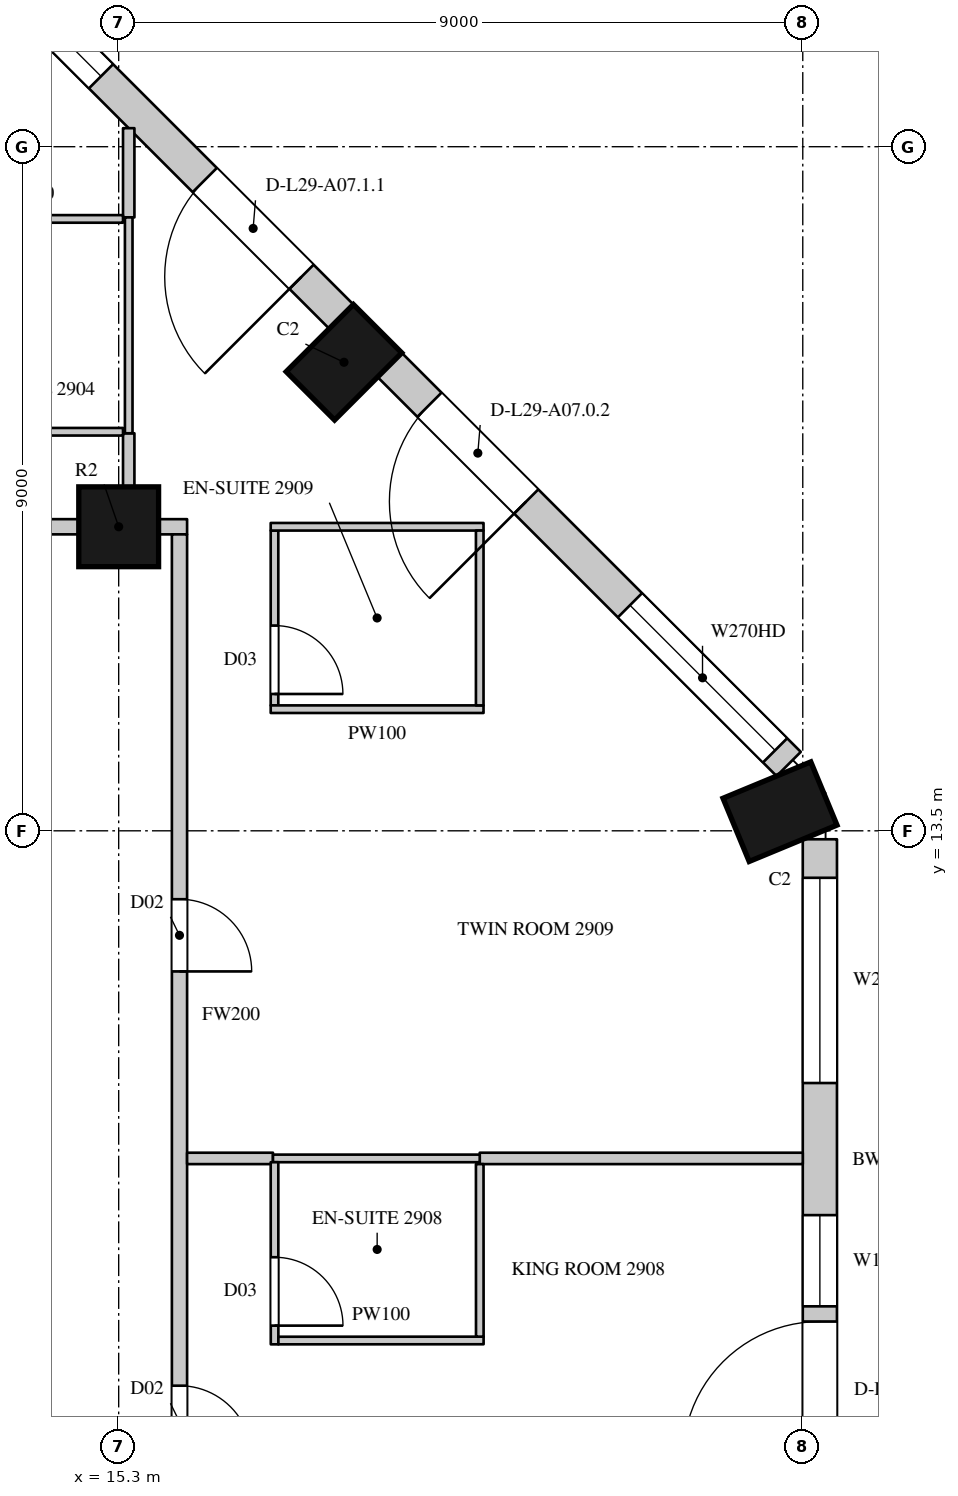
"""IFC4 building model, lengths in metres.
Left out: names, types, materials, properties, quantities, classifications, styles, units other than length and angle.
Written with IfcOpenShell. Run it as: python <this file> out.ifc"""

import sys

from ifc_helpers import new_model, si_unit, direction, frame, frame_2d, origin, origin_2d, place, context, subcontext, project, spatial, rectangle, circle, extrude, element, fill, save


model = new_model("IFC4")
c1 = context("Model", 3, precision=1e-05, world=origin(), true_north=direction((0.0, 1.0)))
c2 = subcontext(c1, "Body", "Model", "MODEL_VIEW")
j1 = project(units=[si_unit("LENGTHUNIT", "METRE"), si_unit("PLANEANGLEUNIT", "RADIAN")], contexts=[c1])
p1 = place(None, origin())
s1 = spatial("IfcSite", under=j1, at=p1, CompositionType="ELEMENT")
p2 = place(p1, origin())
s2 = spatial("IfcBuilding", under=s1, at=p2, CompositionType="ELEMENT")
p3 = place(p2, frame((0.0, 0.0, 134.7)))
s3 = spatial("IfcBuildingStorey", under=s2, at=p3, CompositionType="ELEMENT", Elevation=134.7)
for number, where, z_axis, x_axis in (
    (1, (24.0, 13.752, 0.0), (0.0, 0.0, 1.0), (-0.383, 0.924, 0.0)),
    (2, (18.264, 19.664, 0.0), (0.0, 0.0, 1.0), (-0.707, 0.707, 0.0)),
):
    element("IfcColumn", number, at=place(p3, frame(where, z_axis=z_axis, x_axis=x_axis)), inside=s3, PredefinedType="COLUMN", context=c2, shape_type="SweptSolid", body=[
        extrude(rectangle(XDim=0.9, YDim=1.25, at=origin_2d()), origin(), (0.0, 0.0, 1.0), 3.6),
    ])
p4 = place(p3, frame((15.3, 17.5, 0.0), z_axis=(0.0, 0.0, 1.0), x_axis=(1.0, 0.0, 0.0)))
e3 = element("IfcColumn", 3, at=p4, inside=s3, PredefinedType="COLUMN", context=c2, shape_type="SweptSolid", body=[
    extrude(circle(Radius=0.525, at=origin_2d()), origin(), (0.0, 0.0, 1.0), 3.6),
])
p5 = place(p3, frame((24.525, 4.95, 0.0), z_axis=(0.0, 0.0, 1.0), x_axis=(0.0, 1.0, 0.0)))
e4 = element("IfcWall", 4, at=p5, inside=s3, PredefinedType="SOLIDWALL", context=c2, shape_type="SweptSolid", body=[
    extrude(rectangle(XDim=8.439, YDim=0.45, at=frame_2d((4.219, 0.0))), origin(), (0.0, 0.0, 1.0), 3.3),
])
p6 = place(p5, frame((0.294, 0.0, 0.0)))
e5 = element("IfcOpeningElement", 5, at=p6, cuts=e4, PredefinedType="OPENING", context=c2, shape_type="SweptSolid", body=[
    extrude(rectangle(XDim=1.8, YDim=2.4, at=frame_2d((0.9, 1.2))), frame((0.0, 0.235, 0.0), z_axis=(0.0, -1.0, 0.0), x_axis=(1.0, 0.0, 0.0)), (0.0, 0.0, 1.0), 0.47),
])
p7 = place(p5, frame((2.294, 0.0, 1.05)))
e6 = element("IfcOpeningElement", 6, at=p7, cuts=e4, PredefinedType="OPENING", context=c2, shape_type="SweptSolid", body=[
    extrude(rectangle(XDim=1.2, YDim=2.0, at=frame_2d((0.6, 1.0))), frame((0.0, 0.235, 0.0), z_axis=(0.0, -1.0, 0.0), x_axis=(1.0, 0.0, 0.0)), (0.0, 0.0, 1.0), 0.47),
])
p8 = place(p5, frame((5.232, 0.0, 1.05)))
e7 = element("IfcOpeningElement", 7, at=p8, cuts=e4, PredefinedType="OPENING", context=c2, shape_type="SweptSolid", body=[
    extrude(rectangle(XDim=2.7, YDim=2.0, at=frame_2d((1.35, 1.0))), frame((0.0, 0.235, 0.0), z_axis=(0.0, -1.0, 0.0), x_axis=(1.0, 0.0, 0.0)), (0.0, 0.0, 1.0), 0.47),
])
p9 = place(p3, frame((24.115, 14.379, 0.0), z_axis=(0.0, 0.0, 1.0), x_axis=(-0.707106781187, 0.707106781187, 0.0)))
e8 = element("IfcWall", 8, at=p9, inside=s3, PredefinedType="SOLIDWALL", context=c2, shape_type="SweptSolid", body=[
    extrude(rectangle(XDim=7.424, YDim=0.45, at=frame_2d((3.712, 0.0))), origin(), (0.0, 0.0, 1.0), 3.3),
])
p10 = place(p9, frame((0.253, 0.0, 1.05)))
e9 = element("IfcOpeningElement", 9, at=p10, cuts=e8, PredefinedType="OPENING", context=c2, shape_type="SweptSolid", body=[
    extrude(rectangle(XDim=2.7, YDim=2.0, at=frame_2d((1.35, 1.0))), frame((0.0, 0.235, 0.0), z_axis=(0.0, -1.0, 0.0), x_axis=(1.0, 0.0, 0.0)), (0.0, 0.0, 1.0), 0.47),
])
p11 = place(p9, frame((4.884, 0.0, 0.0)))
e10 = element("IfcOpeningElement", 10, at=p11, cuts=e8, PredefinedType="OPENING", context=c2, shape_type="SweptSolid", body=[
    extrude(rectangle(XDim=1.8, YDim=2.4, at=frame_2d((0.9, 1.2))), frame((0.0, 0.235, 0.0), z_axis=(0.0, -1.0, 0.0), x_axis=(1.0, 0.0, 0.0)), (0.0, 0.0, 1.0), 0.47),
])
p12 = place(p3, frame((18.229, 20.265, 0.0), z_axis=(0.0, 0.0, 1.0), x_axis=(-0.707106781187, 0.707106781187, 0.0)))
e11 = element("IfcWall", 11, at=p12, inside=s3, PredefinedType="SOLIDWALL", context=c2, shape_type="SweptSolid", body=[
    extrude(rectangle(XDim=7.424, YDim=0.45, at=frame_2d((3.712, 0.0))), origin(), (0.0, 0.0, 1.0), 3.3),
])
p13 = place(p12, frame((0.74, 0.0, 0.0)))
e12 = element("IfcOpeningElement", 12, at=p13, cuts=e11, PredefinedType="OPENING", context=c2, shape_type="SweptSolid", body=[
    extrude(rectangle(XDim=1.8, YDim=2.4, at=frame_2d((0.9, 1.2))), frame((0.0, 0.235, 0.0), z_axis=(0.0, -1.0, 0.0), x_axis=(1.0, 0.0, 0.0)), (0.0, 0.0, 1.0), 0.47),
])
p14 = place(p12, frame((4.471, 0.0, 1.05)))
e13 = element("IfcOpeningElement", 13, at=p14, cuts=e11, PredefinedType="OPENING", context=c2, shape_type="SweptSolid", body=[
    extrude(rectangle(XDim=2.7, YDim=2.0, at=frame_2d((1.35, 1.0))), frame((0.0, 0.235, 0.0), z_axis=(0.0, -1.0, 0.0), x_axis=(1.0, 0.0, 0.0)), (0.0, 0.0, 1.0), 0.47),
])
p15 = place(p3, frame((23.15, 16.864, 0.0), z_axis=(0.0, 0.0, 1.0), x_axis=(-0.707106781187, 0.707106781187, 0.0)))
e14 = element("IfcWall", 14, at=p15, inside=s3, PredefinedType="SOLIDWALL", context=c2, shape_type="SweptSolid", body=[
    extrude(rectangle(XDim=1.445, YDim=0.45, at=frame_2d((0.722, 0.0))), origin(), (0.0, 0.0, 1.0), 0.6),
])
p16 = place(p3, frame((19.937, 20.078, 0.0), z_axis=(0.0, 0.0, 1.0), x_axis=(-0.707106781187, 0.707106781187, 0.0)))
e15 = element("IfcWall", 15, at=p16, inside=s3, PredefinedType="SOLIDWALL", context=c2, shape_type="SweptSolid", body=[
    extrude(rectangle(XDim=1.781, YDim=0.45, at=frame_2d((0.89, 0.0))), origin(), (0.0, 0.0, 1.0), 0.6),
])
p17 = place(p3, frame((16.486, 23.529, 0.0), z_axis=(0.0, 0.0, 1.0), x_axis=(-0.707022305137, 0.707191247145, 0.0)))
e16 = element("IfcWall", 16, at=p17, inside=s3, PredefinedType="SOLIDWALL", context=c2, shape_type="SweptSolid", body=[
    extrude(rectangle(XDim=1.445, YDim=0.45, at=frame_2d((0.723, 0.0))), origin(), (0.0, 0.0, 1.0), 0.6),
])
p18 = place(p3, frame((6.825, 17.5, 0.0), z_axis=(0.0, 0.0, 1.0), x_axis=(1.0, 0.0, 0.0)))
e17 = element("IfcWall", 17, at=p18, inside=s3, PredefinedType="PARTITIONING", context=c2, shape_type="SweptSolid", body=[
    extrude(rectangle(XDim=7.95, YDim=0.2, at=frame_2d((3.975, 0.0))), origin(), (0.0, 0.0, 1.0), 2.75),
])
p19 = place(p18, frame((1.55, 0.0, 0.0)))
e18 = element("IfcOpeningElement", 18, at=p19, cuts=e17, PredefinedType="OPENING", context=c2, shape_type="SweptSolid", body=[
    extrude(rectangle(XDim=1.1, YDim=2.4, at=frame_2d((0.55, 1.2))), frame((0.0, 0.11, 0.0), z_axis=(0.0, -1.0, 0.0), x_axis=(1.0, 0.0, 0.0)), (0.0, 0.0, 1.0), 0.22),
])
p20 = place(p3, frame((15.825, 17.5, 0.0), z_axis=(0.0, 0.0, 1.0), x_axis=(1.0, 0.0, 0.0)))
e19 = element("IfcWall", 19, at=p20, inside=s3, PredefinedType="PARTITIONING", context=c2, shape_type="SweptSolid", body=[
    extrude(rectangle(XDim=0.375, YDim=0.2, at=frame_2d((0.188, 0.0))), origin(), (0.0, 0.0, 1.0), 3.3),
])
p21 = place(p3, frame((16.1, 4.75, 0.0), z_axis=(0.0, 0.0, 1.0), x_axis=(0.0, 1.0, 0.0)))
e20 = element("IfcWall", 20, at=p21, inside=s3, PredefinedType="PARTITIONING", context=c2, shape_type="SweptSolid", body=[
    extrude(rectangle(XDim=12.65, YDim=0.2, at=frame_2d((6.325, 0.0))), origin(), (0.0, 0.0, 1.0), 3.3),
])
p22 = place(p21, frame((0.5, 0.0, 0.0)))
e21 = element("IfcOpeningElement", 21, at=p22, cuts=e20, PredefinedType="OPENING", context=c2, shape_type="SweptSolid", body=[
    extrude(rectangle(XDim=0.95, YDim=2.2, at=frame_2d((0.475, 1.1))), frame((0.0, 0.11, 0.0), z_axis=(0.0, -1.0, 0.0), x_axis=(1.0, 0.0, 0.0)), (0.0, 0.0, 1.0), 0.22),
])
p23 = place(p21, frame((6.9, 0.0, 0.0)))
e22 = element("IfcOpeningElement", 22, at=p23, cuts=e20, PredefinedType="OPENING", context=c2, shape_type="SweptSolid", body=[
    extrude(rectangle(XDim=0.95, YDim=2.2, at=frame_2d((0.475, 1.1))), frame((0.0, 0.11, 0.0), z_axis=(0.0, -1.0, 0.0), x_axis=(1.0, 0.0, 0.0)), (0.0, 0.0, 1.0), 0.22),
])
p24 = place(p3, frame((15.432, 18.016, 0.0), z_axis=(0.0, 0.0, 1.0), x_axis=(0.0, 1.0, 0.0)))
e23 = element("IfcWall", 23, at=p24, inside=s3, PredefinedType="PARTITIONING", context=c2, shape_type="SweptSolid", body=[
    extrude(rectangle(XDim=0.714, YDim=0.15, at=frame_2d((0.357, 0.0))), origin(), (0.0, 0.0, 1.0), 3.3),
])
p25 = place(p3, frame((15.432, 21.57, 0.0), z_axis=(0.0, 0.0, 1.0), x_axis=(0.0, 1.0, 0.0)))
e24 = element("IfcWall", 24, at=p25, inside=s3, PredefinedType="PARTITIONING", context=c2, shape_type="SweptSolid", body=[
    extrude(rectangle(XDim=1.174, YDim=0.15, at=frame_2d((0.587, 0.0))), origin(), (0.0, 0.0, 1.0), 3.3),
])
p26 = place(p3, frame((16.2, 9.19, 0.0), z_axis=(0.0, 0.0, 1.0), x_axis=(1.0, 0.0, 0.0)))
e25 = element("IfcWall", 25, at=p26, inside=s3, PredefinedType="PARTITIONING", context=c2, shape_type="SweptSolid", body=[
    extrude(rectangle(XDim=1.13, YDim=0.15, at=frame_2d((0.565, 0.0))), origin(), (0.0, 0.0, 1.0), 2.65),
])
p27 = place(p3, frame((20.05, 9.19, 0.0), z_axis=(0.0, 0.0, 1.0), x_axis=(1.0, 0.0, 0.0)))
e26 = element("IfcWall", 26, at=p27, inside=s3, PredefinedType="PARTITIONING", context=c2, shape_type="SweptSolid", body=[
    extrude(rectangle(XDim=4.25, YDim=0.15, at=frame_2d((2.125, 0.0))), origin(), (0.0, 0.0, 1.0), 2.65),
])
for number, where, z_axis, x_axis in (
    (27, (12.786, 18.75, 0.0), (0.0, 0.0, 1.0), (1.0, 0.0, 0.0)),
    (28, (12.786, 21.55, 0.0), (0.0, 0.0, 1.0), (1.0, 0.0, 0.0)),
):
    element("IfcWall", number, at=place(p3, frame(where, z_axis=z_axis, x_axis=x_axis)), inside=s3, PredefinedType="PARTITIONING", context=c2, shape_type="SweptSolid", body=[
        extrude(rectangle(XDim=2.571, YDim=0.1, at=frame_2d((1.286, 0.0))), origin(), (0.0, 0.0, 1.0), 3.3),
    ])
p28 = place(p3, frame((15.432, 18.73, 0.0), z_axis=(0.0, 0.0, 1.0), x_axis=(0.0, 1.0, 0.0)))
e29 = element("IfcWall", 29, at=p28, inside=s3, PredefinedType="PARTITIONING", context=c2, shape_type="SweptSolid", body=[
    extrude(rectangle(XDim=2.84, YDim=0.1, at=frame_2d((1.42, 0.0))), origin(), (0.0, 0.0, 1.0), 3.3),
])
p29 = place(p3, frame((17.33, 9.19, 0.0), z_axis=(0.0, 0.0, 1.0), x_axis=(1.0, 0.0, 0.0)))
e30 = element("IfcWall", 30, at=p29, inside=s3, PredefinedType="PARTITIONING", context=c2, shape_type="SweptSolid", body=[
    extrude(rectangle(XDim=2.72, YDim=0.1, at=frame_2d((1.36, 0.0))), origin(), (0.0, 0.0, 1.0), 2.65),
])
p30 = place(p3, frame((17.35, 9.14, 0.0), z_axis=(0.0, 0.0, 1.0), x_axis=(0.000407580973, -0.999999916939, 0.0)))
e31 = element("IfcWall", 31, at=p30, inside=s3, PredefinedType="PARTITIONING", context=c2, shape_type="SweptSolid", body=[
    extrude(rectangle(XDim=2.396, YDim=0.1, at=frame_2d((1.198, 0.0))), origin(), (0.0, 0.0, 1.0), 3.3),
])
p31 = place(p30, frame((1.25, 0.0, 0.0)))
e32 = element("IfcOpeningElement", 32, at=p31, cuts=e31, PredefinedType="OPENING", context=c2, shape_type="SweptSolid", body=[
    extrude(rectangle(XDim=0.9, YDim=2.2, at=frame_2d((0.45, 1.1))), frame((0.0, 0.06, 0.0), z_axis=(0.0, -1.0, 0.0), x_axis=(1.0, 0.0, 0.0)), (0.0, 0.0, 1.0), 0.12),
])
p32 = place(p3, frame((17.35, 15.15, 0.0), z_axis=(0.0, 0.0, 1.0), x_axis=(0.0, 1.0, 0.0)))
e33 = element("IfcWall", 33, at=p32, inside=s3, PredefinedType="PARTITIONING", context=c2, shape_type="SweptSolid", body=[
    extrude(rectangle(XDim=2.3, YDim=0.1, at=frame_2d((1.15, 0.0))), origin(), (0.0, 0.0, 1.0), 3.3),
])
p33 = place(p32, frame((0.15, 0.0, 0.0)))
e34 = element("IfcOpeningElement", 34, at=p33, cuts=e33, PredefinedType="OPENING", context=c2, shape_type="SweptSolid", body=[
    extrude(rectangle(XDim=0.9, YDim=2.2, at=frame_2d((0.45, 1.1))), frame((0.0, 0.06, 0.0), z_axis=(0.0, -1.0, 0.0), x_axis=(1.0, 0.0, 0.0)), (0.0, 0.0, 1.0), 0.12),
])
for number, where, z_axis, x_axis in (
    (35, (17.3, 15.1, 0.0), (0.0, 0.0, 1.0), (1.0, 0.0, 0.0)),
    (36, (17.3, 17.5, 0.0), (0.0, 0.0, 1.0), (1.0, 0.0, 0.0)),
):
    element("IfcWall", number, at=place(p3, frame(where, z_axis=z_axis, x_axis=x_axis)), inside=s3, PredefinedType="PARTITIONING", context=c2, shape_type="SweptSolid", body=[
        extrude(rectangle(XDim=2.8, YDim=0.1, at=frame_2d((1.4, 0.0))), origin(), (0.0, 0.0, 1.0), 3.3),
    ])
p34 = place(p3, frame((17.401, 6.794, 0.0), z_axis=(0.0, 0.0, 1.0), x_axis=(0.9999999346, 0.000361663629, 0.0)))
e37 = element("IfcWall", 37, at=p34, inside=s3, PredefinedType="PARTITIONING", context=c2, shape_type="SweptSolid", body=[
    extrude(rectangle(XDim=2.7, YDim=0.1, at=frame_2d((1.35, 0.0))), origin(), (0.0, 0.0, 1.0), 3.3),
])
p35 = place(p3, frame((20.05, 9.115, 0.0), z_axis=(0.0, 0.0, 1.0), x_axis=(0.000430200003, -0.999999907464, 0.0)))
e38 = element("IfcWall", 38, at=p35, inside=s3, PredefinedType="PARTITIONING", context=c2, shape_type="SweptSolid", body=[
    extrude(rectangle(XDim=2.27, YDim=0.1, at=frame_2d((1.135, 0.0))), origin(), (0.0, 0.0, 1.0), 3.3),
])
p36 = place(p3, frame((20.05, 15.15, 0.0), z_axis=(0.0, 0.0, 1.0), x_axis=(0.0, 1.0, 0.0)))
e39 = element("IfcWall", 39, at=p36, inside=s3, PredefinedType="PARTITIONING", context=c2, shape_type="SweptSolid", body=[
    extrude(rectangle(XDim=2.3, YDim=0.1, at=frame_2d((1.15, 0.0))), origin(), (0.0, 0.0, 1.0), 3.3),
])
p37 = place(p6, origin())
e40 = element("IfcDoor", 40, at=p37, inside=s3, OperationType="SLIDING_TO_LEFT", PredefinedType="DOOR", context=c2, shape_type="SweptSolid", body=[
    extrude(rectangle(XDim=1.8, YDim=2.4, at=frame_2d((0.9, 1.2))), frame((0.0, 0.13, 0.0), z_axis=(0.0, -1.0, 0.0), x_axis=(1.0, 0.0, 0.0)), (0.0, 0.0, 1.0), 0.05),
])
fill(e5, e40)
p38 = place(p7, origin())
e41 = element("IfcWindow", 41, at=p38, inside=s3, PartitioningType="SINGLE_PANEL", PredefinedType="WINDOW", context=c2, shape_type="SweptSolid", body=[
    extrude(rectangle(XDim=1.2, YDim=2.0, at=frame_2d((0.6, 1.0))), frame((0.0, 0.135, 0.0), z_axis=(0.0, -1.0, 0.0), x_axis=(1.0, 0.0, 0.0)), (0.0, 0.0, 1.0), 0.06),
])
fill(e6, e41)
p39 = place(p8, origin())
e42 = element("IfcWindow", 42, at=p39, inside=s3, PartitioningType="SINGLE_PANEL", PredefinedType="WINDOW", context=c2, shape_type="SweptSolid", body=[
    extrude(rectangle(XDim=2.7, YDim=2.0, at=frame_2d((1.35, 1.0))), frame((0.0, 0.135, 0.0), z_axis=(0.0, -1.0, 0.0), x_axis=(1.0, 0.0, 0.0)), (0.0, 0.0, 1.0), 0.06),
])
fill(e7, e42)
p40 = place(p10, origin())
e43 = element("IfcWindow", 43, at=p40, inside=s3, PartitioningType="SINGLE_PANEL", PredefinedType="WINDOW", context=c2, shape_type="SweptSolid", body=[
    extrude(rectangle(XDim=2.7, YDim=2.0, at=frame_2d((1.35, 1.0))), frame((0.0, 0.135, 0.0), z_axis=(0.0, -1.0, 0.0), x_axis=(1.0, 0.0, 0.0)), (0.0, 0.0, 1.0), 0.06),
])
fill(e9, e43)
p41 = place(p11, origin())
e44 = element("IfcDoor", 44, at=p41, inside=s3, OperationType="SLIDING_TO_LEFT", PredefinedType="DOOR", context=c2, shape_type="SweptSolid", body=[
    extrude(rectangle(XDim=1.8, YDim=2.4, at=frame_2d((0.9, 1.2))), frame((0.0, 0.13, 0.0), z_axis=(0.0, -1.0, 0.0), x_axis=(1.0, 0.0, 0.0)), (0.0, 0.0, 1.0), 0.05),
])
fill(e10, e44)
p42 = place(p13, origin())
e45 = element("IfcDoor", 45, at=p42, inside=s3, OperationType="SLIDING_TO_LEFT", PredefinedType="DOOR", context=c2, shape_type="SweptSolid", body=[
    extrude(rectangle(XDim=1.8, YDim=2.4, at=frame_2d((0.9, 1.2))), frame((0.0, 0.13, 0.0), z_axis=(0.0, -1.0, 0.0), x_axis=(1.0, 0.0, 0.0)), (0.0, 0.0, 1.0), 0.05),
])
fill(e12, e45)
p43 = place(p14, origin())
e46 = element("IfcWindow", 46, at=p43, inside=s3, PartitioningType="SINGLE_PANEL", PredefinedType="WINDOW", context=c2, shape_type="SweptSolid", body=[
    extrude(rectangle(XDim=2.7, YDim=2.0, at=frame_2d((1.35, 1.0))), frame((0.0, 0.135, 0.0), z_axis=(0.0, -1.0, 0.0), x_axis=(1.0, 0.0, 0.0)), (0.0, 0.0, 1.0), 0.06),
])
fill(e13, e46)
p44 = place(p22, origin())
e47 = element("IfcDoor", 47, at=p44, inside=s3, OperationType="SINGLE_SWING_RIGHT", PredefinedType="DOOR", context=c2, shape_type="SweptSolid", body=[
    extrude(rectangle(XDim=0.95, YDim=2.2, at=frame_2d((0.475, 1.1))), frame((0.0, 0.025, 0.0), z_axis=(0.0, -1.0, 0.0), x_axis=(1.0, 0.0, 0.0)), (0.0, 0.0, 1.0), 0.05),
])
fill(e21, e47)
p45 = place(p31, origin())
e48 = element("IfcDoor", 48, at=p45, inside=s3, OperationType="SINGLE_SWING_RIGHT", PredefinedType="DOOR", context=c2, shape_type="SweptSolid", body=[
    extrude(rectangle(XDim=0.9, YDim=2.2, at=frame_2d((0.45, 1.1))), frame((0.0, 0.025, 0.0), z_axis=(0.0, -1.0, 0.0), x_axis=(1.0, 0.0, 0.0)), (0.0, 0.0, 1.0), 0.05),
])
fill(e32, e48)
p46 = place(p23, origin())
e49 = element("IfcDoor", 49, at=p46, inside=s3, OperationType="SINGLE_SWING_RIGHT", PredefinedType="DOOR", context=c2, shape_type="SweptSolid", body=[
    extrude(rectangle(XDim=0.95, YDim=2.2, at=frame_2d((0.475, 1.1))), frame((0.0, 0.025, 0.0), z_axis=(0.0, -1.0, 0.0), x_axis=(1.0, 0.0, 0.0)), (0.0, 0.0, 1.0), 0.05),
])
fill(e22, e49)
p47 = place(p33, origin())
e50 = element("IfcDoor", 50, at=p47, inside=s3, OperationType="SINGLE_SWING_RIGHT", PredefinedType="DOOR", context=c2, shape_type="SweptSolid", body=[
    extrude(rectangle(XDim=0.9, YDim=2.2, at=frame_2d((0.45, 1.1))), frame((0.0, 0.025, 0.0), z_axis=(0.0, -1.0, 0.0), x_axis=(1.0, 0.0, 0.0)), (0.0, 0.0, 1.0), 0.05),
])
fill(e34, e50)
save(model, sys.argv[1])
